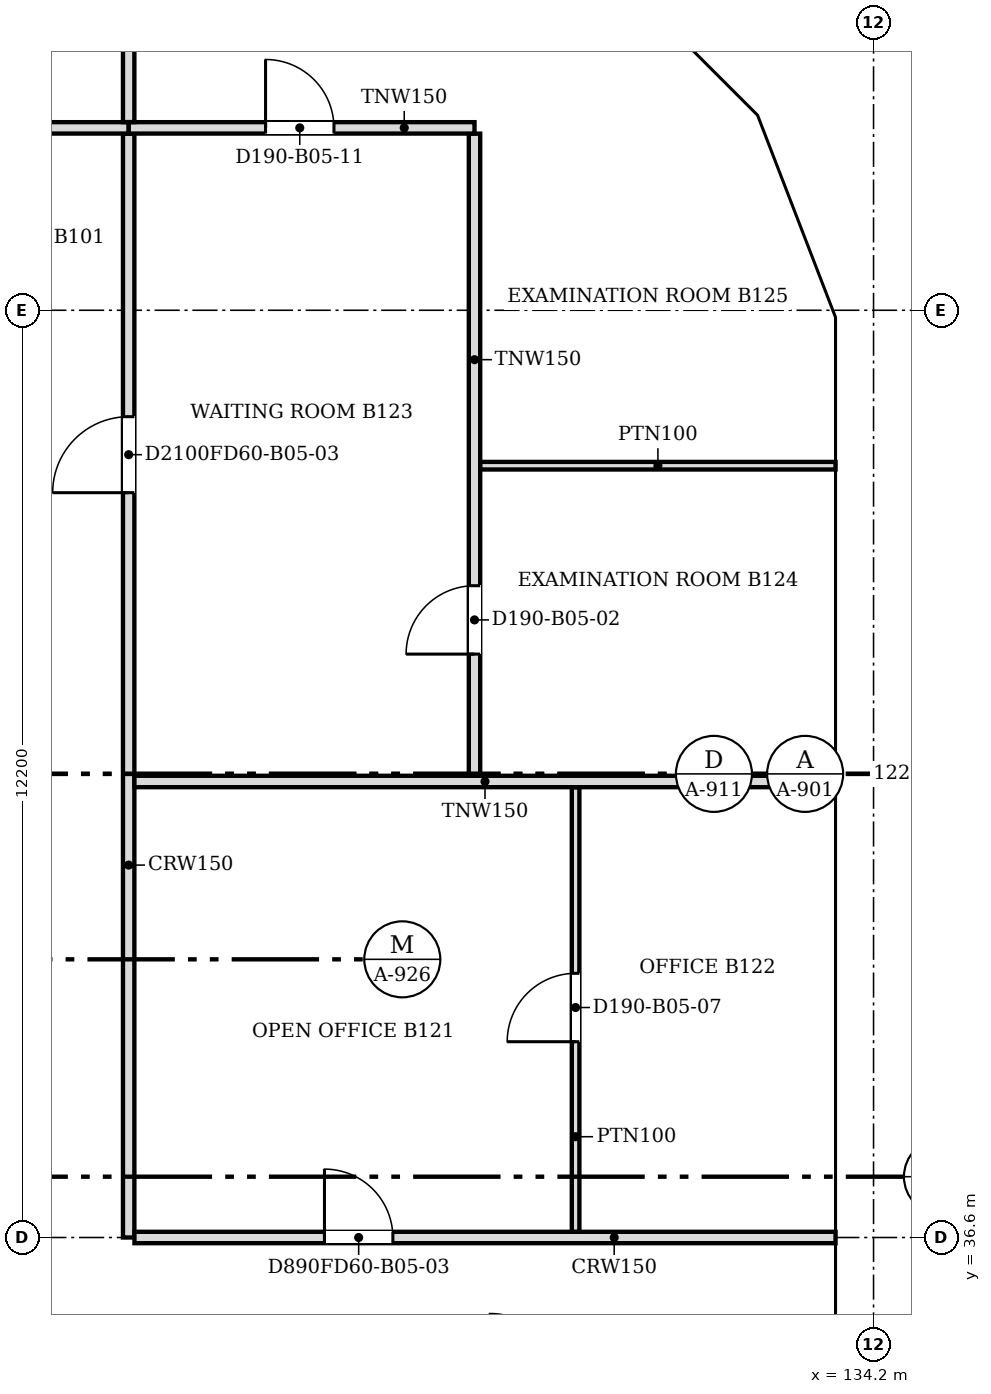
"""IFC4 building model, lengths in metres.
Left out: names, types, materials, properties, quantities, classifications, styles, units other than length and angle.
Written with IfcOpenShell. Run it as: python <this file> out.ifc"""

import sys

from ifc_helpers import new_model, si_unit, direction, frame, frame_2d, origin, place, context, subcontext, project, spatial, polyline, rectangle, outline, extrude, faceted_brep, source, transform, mapped, element, fill, save


model = new_model("IFC4")
c1 = context("Model", 3, precision=1e-05, world=origin(), true_north=direction((0.0, 1.0)))
c2 = subcontext(c1, "Body", "Model", "MODEL_VIEW")
j1 = project(units=[si_unit("LENGTHUNIT", "METRE"), si_unit("PLANEANGLEUNIT", "RADIAN")], contexts=[c1])
p1 = place(None, origin())
s1 = spatial("IfcSite", under=j1, at=p1, CompositionType="ELEMENT")
p2 = place(p1, origin())
s2 = spatial("IfcBuilding", under=s1, at=p2, CompositionType="ELEMENT")
p3 = place(p2, frame((0.0, 0.0, 48.6)))
s3 = spatial("IfcBuildingStorey", under=s2, at=p3, CompositionType="ELEMENT", Elevation=48.6)
m1 = source(origin(), c2, "Body", "SweptSolid", [
    extrude(outline(polyline([(3.05, 0.0), (6.1, 3.8), (3.05, 7.6), (0.0, 3.8), (3.05, 0.0)])), frame((0.0, 0.25, 0.0), z_axis=(0.0, -1.0, 0.0), x_axis=(1.0, 0.0, 0.0)), (0.0, 0.0, 1.0), 0.5),
])
p4 = place(p3, frame((133.95, 30.5, -3.8), z_axis=(0.0, 0.0, 1.0), x_axis=(0.0, 1.0, 0.0)))
e1 = element("IfcWall", 1, at=p4, inside=s3, PredefinedType="SOLIDWALL", context=c2, shape_type="MappedRepresentation", body=[
    mapped(m1, transform((0.0, 0.0, 0.0), scale=1.0)),
])
m2 = source(origin(), c2, "Body", "SweptSolid", [
    extrude(outline(polyline([(3.05, 0.399), (5.78, 3.8), (3.05, 7.2), (0.321, 3.8), (3.05, 0.399)])), frame((0.0, 0.26, 0.0), z_axis=(0.0, -1.0, 0.0), x_axis=(1.0, 0.0, 0.0)), (0.0, 0.0, 1.0), 0.52),
])
p5 = place(p4, origin())
e2 = element("IfcOpeningElement", 2, at=p5, cuts=e1, PredefinedType="OPENING", context=c2, shape_type="MappedRepresentation", body=[
    mapped(m2, transform((0.0, 0.0, 0.0), scale=1.0)),
])
m3 = source(origin(), c2, "Body", "Brep", [
    faceted_brep([(3.05, -0.25, 0.0), (6.1, -0.25, 3.8), (6.1, -0.25, 3.8), (3.05, -0.25, 7.6), (0.0, -0.25, 3.8), (0.0, 0.25, 3.8), (3.05, 0.25, 7.6), (6.1, 0.25, 3.8), (6.1, 0.25, 3.8), (3.05, 0.25, 0.0)], [[[0, 1, 2, 3, 4]], [[5, 6, 7, 8, 9]], [[9, 8, 1, 0]], [[7, 6, 3, 2]], [[6, 5, 4, 3]], [[5, 9, 0, 4]], [[1, 8, 7, 2]]]),
])
p6 = place(p3, frame((133.95, 36.6, -3.8), z_axis=(0.0, 0.0, 1.0), x_axis=(0.0, 1.0, 0.0)))
e3 = element("IfcWall", 3, at=p6, inside=s3, PredefinedType="SOLIDWALL", context=c2, shape_type="MappedRepresentation", body=[
    mapped(m3, transform((0.0, 0.0, 0.0), scale=1.0)),
])
p7 = place(p6, origin())
e4 = element("IfcOpeningElement", 4, at=p7, cuts=e3, PredefinedType="OPENING", context=c2, shape_type="MappedRepresentation", body=[
    mapped(m2, transform((0.0, 0.0, 0.0), scale=1.0)),
])
m4 = source(origin(), c2, "Body", "Brep", [
    faceted_brep([(3.05, -0.25, 0.0), (6.053, -0.25, 3.8), (3.05, -0.25, 7.6), (0.0, -0.25, 3.8), (0.0, 0.25, 3.8), (3.05, 0.25, 7.6), (6.007, 0.25, 3.859), (6.007, 0.25, 3.741), (3.05, 0.25, 0.0), (6.053, 0.0, 3.8)], [[[0, 1, 2, 3]], [[4, 5, 6, 7, 8]], [[8, 7, 9, 1, 0]], [[6, 5, 2, 1, 9]], [[5, 4, 3, 2]], [[4, 8, 0, 3]], [[7, 6, 9]]]),
])
p8 = place(p3, frame((133.95, 42.7, -3.8), z_axis=(0.0, 0.0, 1.0), x_axis=(0.0, 1.0, 0.0)))
e5 = element("IfcWall", 5, at=p8, inside=s3, PredefinedType="SOLIDWALL", context=c2, shape_type="MappedRepresentation", body=[
    mapped(m4, transform((0.0, 0.0, 0.0), scale=1.0)),
])
m5 = source(origin(), c2, "Body", "SweptSolid", [
    extrude(outline(polyline([(3.049, 0.401), (5.735, 3.8), (3.049, 7.199), (0.321, 3.8), (3.049, 0.401)])), frame((0.0, 0.26, 0.0), z_axis=(0.0, -1.0, 0.0), x_axis=(1.0, 0.0, 0.0)), (0.0, 0.0, 1.0), 0.52),
])
p9 = place(p8, origin())
e6 = element("IfcOpeningElement", 6, at=p9, cuts=e5, PredefinedType="OPENING", context=c2, shape_type="MappedRepresentation", body=[
    mapped(m5, transform((0.0, 0.0, 0.0), scale=1.0)),
])
m6 = source(origin(), c2, "Body", "Brep", [
    faceted_brep([(2.95, -0.25, 0.0), (3.003, -0.25, 0.068), (3.003, -0.25, 7.531), (2.95, -0.25, 7.6), (0.0, -0.25, 3.8), (0.047, 0.25, 3.86), (2.898, 0.25, 7.532), (2.898, 0.25, 0.068), (0.047, 0.25, 3.74), (2.95, 0.0, 0.0), (2.95, 0.0, 7.6), (0.0, 0.0, 3.8)], [[[0, 1, 2, 3, 4]], [[5, 6, 7, 8]], [[1, 0, 9]], [[10, 3, 2]], [[6, 5, 11, 4, 3, 10]], [[8, 7, 9, 0, 4, 11]], [[8, 11, 5]], [[1, 9, 7, 6, 10, 2]]]),
])
p10 = place(p3, frame((133.95, 48.753, -3.8), z_axis=(0.0, 0.0, 1.0), x_axis=(-0.359855894603, 0.933007896601, 0.0)))
e7 = element("IfcWall", 7, at=p10, inside=s3, PredefinedType="SOLIDWALL", context=c2, shape_type="MappedRepresentation", body=[
    mapped(m6, transform((0.0, 0.0, 0.0), scale=1.0)),
])
m7 = source(origin(), c2, "Body", "SweptSolid", [
    extrude(outline(polyline([(2.75, 6.935), (0.316, 3.8), (2.75, 0.665), (2.75, 6.935)])), frame((0.0, 0.26, 0.0), z_axis=(0.0, -1.0, 0.0), x_axis=(1.0, 0.0, 0.0)), (0.0, 0.0, 1.0), 0.52),
])
p11 = place(p10, origin())
e8 = element("IfcOpeningElement", 8, at=p11, cuts=e7, PredefinedType="OPENING", context=c2, shape_type="MappedRepresentation", body=[
    mapped(m7, transform((0.0, 0.0, 0.0), scale=1.0)),
])
m8 = source(origin(), c2, "Body", "Brep", [
    faceted_brep([(0.053, -0.25, 0.0), (2.997, -0.25, 3.8), (0.053, -0.25, 7.6), (0.0, -0.25, 7.532), (0.0, -0.25, 0.068), (0.106, 0.25, 7.531), (2.944, 0.25, 3.868), (2.944, 0.25, 3.732), (0.106, 0.25, 0.068), (2.997, 0.0, 3.8), (0.053, 0.0, 0.0), (0.053, 0.0, 7.6)], [[[0, 1, 2, 3, 4]], [[5, 6, 7, 8]], [[8, 7, 9, 1, 0, 10]], [[6, 5, 11, 2, 1, 9]], [[3, 2, 11]], [[10, 0, 4]], [[8, 10, 4, 3, 11, 5]], [[7, 6, 9]]]),
])
p12 = place(p3, frame((132.926, 51.469, -3.8), z_axis=(0.0, 0.0, 1.0), x_axis=(-0.707066050402, 0.707147509625, 0.0)))
e9 = element("IfcWall", 9, at=p12, inside=s3, PredefinedType="SOLIDWALL", context=c2, shape_type="MappedRepresentation", body=[
    mapped(m8, transform((0.0, 0.0, 0.0), scale=1.0)),
])
m9 = source(origin(), c2, "Body", "SweptSolid", [
    extrude(outline(polyline([(0.253, 0.666), (2.681, 3.8), (0.253, 6.934), (0.253, 0.666)])), frame((0.0, 0.26, 0.0), z_axis=(0.0, -1.0, 0.0), x_axis=(1.0, 0.0, 0.0)), (0.0, 0.0, 1.0), 0.52),
])
p13 = place(p12, origin())
e10 = element("IfcOpeningElement", 10, at=p13, cuts=e9, PredefinedType="OPENING", context=c2, shape_type="MappedRepresentation", body=[
    mapped(m9, transform((0.0, 0.0, 0.0), scale=1.0)),
])
p14 = place(p2, frame((0.0, 0.0, 52.4)))
s4 = spatial("IfcBuildingStorey", under=s2, at=p14, CompositionType="ELEMENT", Elevation=52.4)
m10 = source(origin(), c2, "Body", "Brep", [
    faceted_brep([(3.05, -0.25, 0.0), (6.1, -0.25, 3.8), (6.1, -0.25, 3.8), (3.05, -0.25, 7.6), (0.0, -0.25, 3.8), (0.0, 0.25, 3.8), (3.05, 0.25, 7.6), (6.1, 0.25, 3.8), (6.1, 0.25, 3.8), (3.05, 0.25, 0.0)], [[[0, 1, 2, 3, 4]], [[5, 6, 7, 8, 9]], [[9, 8, 1, 0]], [[7, 6, 3, 2]], [[6, 5, 4, 3]], [[5, 9, 0, 4]], [[1, 8, 7, 2]]]),
])
p15 = place(p14, frame((133.95, 33.55, -3.8), z_axis=(0.0, 0.0, 1.0), x_axis=(0.0, 1.0, 0.0)))
e11 = element("IfcWall", 11, at=p15, inside=s4, PredefinedType="SOLIDWALL", context=c2, shape_type="MappedRepresentation", body=[
    mapped(m10, transform((0.0, 0.0, 0.0), scale=1.0)),
])
m11 = source(origin(), c2, "Body", "SweptSolid", [
    extrude(outline(polyline([(3.05, 0.399), (5.78, 3.8), (3.05, 7.2), (0.321, 3.8), (3.05, 0.399)])), frame((0.0, 0.26, 0.0), z_axis=(0.0, -1.0, 0.0), x_axis=(1.0, 0.0, 0.0)), (0.0, 0.0, 1.0), 0.52),
])
p16 = place(p15, origin())
e12 = element("IfcOpeningElement", 12, at=p16, cuts=e11, PredefinedType="OPENING", context=c2, shape_type="MappedRepresentation", body=[
    mapped(m11, transform((0.0, 0.0, 0.0), scale=1.0)),
])
m12 = source(origin(), c2, "Body", "SweptSolid", [
    extrude(outline(polyline([(3.05, 0.0), (6.1, 3.8), (3.05, 7.6), (0.0, 3.8), (3.05, 0.0)])), frame((0.0, 0.25, 0.0), z_axis=(0.0, -1.0, 0.0), x_axis=(1.0, 0.0, 0.0)), (0.0, 0.0, 1.0), 0.5),
])
p17 = place(p14, frame((133.95, 39.65, -3.8), z_axis=(0.0, 0.0, 1.0), x_axis=(0.0, 1.0, 0.0)))
e13 = element("IfcWall", 13, at=p17, inside=s4, PredefinedType="SOLIDWALL", context=c2, shape_type="MappedRepresentation", body=[
    mapped(m12, transform((0.0, 0.0, 0.0), scale=1.0)),
])
p18 = place(p17, origin())
e14 = element("IfcOpeningElement", 14, at=p18, cuts=e13, PredefinedType="OPENING", context=c2, shape_type="MappedRepresentation", body=[
    mapped(m11, transform((0.0, 0.0, 0.0), scale=1.0)),
])
m13 = source(origin(), c2, "Body", "Brep", [
    faceted_brep([(3.003, -0.25, 0.0), (3.05, -0.25, 0.06), (3.05, -0.25, 7.54), (3.003, -0.25, 7.6), (0.0, -0.25, 3.8), (0.0, 0.25, 3.8), (2.957, 0.25, 7.541), (2.957, 0.25, 0.059), (3.003, 0.0, 0.0), (3.003, 0.0, 7.6)], [[[0, 1, 2, 3, 4]], [[5, 6, 7]], [[1, 0, 8]], [[9, 3, 2]], [[6, 5, 4, 3, 9]], [[5, 7, 8, 0, 4]], [[1, 8, 7, 6, 9, 2]]]),
])
p19 = place(p14, frame((133.95, 45.75, -3.8), z_axis=(0.0, 0.0, 1.0), x_axis=(0.0, 1.0, 0.0)))
e15 = element("IfcWall", 15, at=p19, inside=s4, PredefinedType="SOLIDWALL", context=c2, shape_type="MappedRepresentation", body=[
    mapped(m13, transform((0.0, 0.0, 0.0), scale=1.0)),
])
m14 = source(origin(), c2, "Body", "SweptSolid", [
    extrude(outline(polyline([(2.803, 6.944), (0.319, 3.8), (2.803, 0.656), (2.803, 6.944)])), frame((0.0, 0.26, 0.0), z_axis=(0.0, -1.0, 0.0), x_axis=(1.0, 0.0, 0.0)), (0.0, 0.0, 1.0), 0.52),
])
p20 = place(p19, origin())
e16 = element("IfcOpeningElement", 16, at=p20, cuts=e15, PredefinedType="OPENING", context=c2, shape_type="MappedRepresentation", body=[
    mapped(m14, transform((0.0, 0.0, 0.0), scale=1.0)),
])
m15 = source(origin(), c2, "Body", "Brep", [
    faceted_brep([(0.047, -0.25, 0.0), (2.997, -0.25, 3.8), (0.047, -0.25, 7.6), (0.0, -0.25, 7.541), (0.0, -0.25, 0.059), (0.093, 0.25, 7.54), (2.944, 0.25, 3.868), (2.944, 0.25, 3.732), (0.093, 0.25, 0.06), (2.997, 0.0, 3.8), (0.047, 0.0, 0.0), (0.047, 0.0, 7.6)], [[[0, 1, 2, 3, 4]], [[5, 6, 7, 8]], [[8, 7, 9, 1, 0, 10]], [[6, 5, 11, 2, 1, 9]], [[3, 2, 11]], [[10, 0, 4]], [[8, 10, 4, 3, 11, 5]], [[9, 7, 6]]]),
])
p21 = place(p14, frame((133.967, 48.71, -3.8), z_axis=(0.0, 0.0, 1.0), x_axis=(-0.359901446078, 0.932990326376, 0.0)))
e17 = element("IfcWall", 17, at=p21, inside=s4, PredefinedType="SOLIDWALL", context=c2, shape_type="MappedRepresentation", body=[
    mapped(m15, transform((0.0, 0.0, 0.0), scale=1.0)),
])
m16 = source(origin(), c2, "Body", "SweptSolid", [
    extrude(outline(polyline([(0.247, 0.665), (2.681, 3.8), (0.247, 6.935), (0.247, 0.665)])), frame((0.0, 0.26, 0.0), z_axis=(0.0, -1.0, 0.0), x_axis=(1.0, 0.0, 0.0)), (0.0, 0.0, 1.0), 0.52),
])
p22 = place(p21, origin())
e18 = element("IfcOpeningElement", 18, at=p22, cuts=e17, PredefinedType="OPENING", context=c2, shape_type="MappedRepresentation", body=[
    mapped(m16, transform((0.0, 0.0, 0.0), scale=1.0)),
])
m17 = source(origin(), c2, "Body", "Brep", [
    faceted_brep([(2.944, -0.25, 0.0), (2.997, -0.25, 0.068), (2.997, -0.25, 7.532), (2.944, -0.25, 7.6), (0.0, -0.25, 3.8), (0.053, 0.25, 3.868), (2.891, 0.25, 7.532), (2.891, 0.25, 0.068), (0.053, 0.25, 3.731), (2.944, 0.0, 0.0), (2.944, 0.0, 7.6), (0.0, 0.0, 3.8)], [[[0, 1, 2, 3, 4]], [[5, 6, 7, 8]], [[1, 0, 9]], [[10, 3, 2]], [[6, 5, 11, 4, 3, 10]], [[8, 7, 9, 0, 4, 11]], [[8, 11, 5]], [[1, 9, 7, 6, 10, 2]]]),
])
p23 = place(p14, frame((132.888, 51.506, -3.8), z_axis=(0.0, 0.0, 1.0), x_axis=(-0.707147509625, 0.707066050402, 0.0)))
e19 = element("IfcWall", 19, at=p23, inside=s4, PredefinedType="SOLIDWALL", context=c2, shape_type="MappedRepresentation", body=[
    mapped(m17, transform((0.0, 0.0, 0.0), scale=1.0)),
])
m18 = source(origin(), c2, "Body", "SweptSolid", [
    extrude(outline(polyline([(2.744, 6.934), (0.316, 3.8), (2.744, 0.666), (2.744, 6.934)])), frame((0.0, 0.26, 0.0), z_axis=(0.0, -1.0, 0.0), x_axis=(1.0, 0.0, 0.0)), (0.0, 0.0, 1.0), 0.52),
])
p24 = place(p23, origin())
e20 = element("IfcOpeningElement", 20, at=p24, cuts=e19, PredefinedType="OPENING", context=c2, shape_type="MappedRepresentation", body=[
    mapped(m18, transform((0.0, 0.0, 0.0), scale=1.0)),
])
p25 = place(p3, frame((124.4, 51.124, 0.0), z_axis=(0.0, 0.0, 1.0), x_axis=(0.0, -1.0, 0.0)))
e21 = element("IfcWall", 21, at=p25, inside=s3, PredefinedType="PARTITIONING", context=c2, shape_type="SweptSolid", body=[
    extrude(rectangle(XDim=14.524, YDim=0.15, at=frame_2d((7.262, 0.0))), origin(), (0.0, 0.0, 1.0), 3.067),
])
m19 = source(origin(), c2, "Body", "SweptSolid", [
    extrude(rectangle(XDim=1.0, YDim=2.1, at=frame_2d((0.5, 1.05))), frame((0.0, 0.085, 0.0), z_axis=(0.0, -1.0, 0.0), x_axis=(1.0, 0.0, 0.0)), (0.0, 0.0, 1.0), 0.17),
])
p26 = place(p25, frame((3.724, 0.0, 0.0)))
e22 = element("IfcOpeningElement", 22, at=p26, cuts=e21, PredefinedType="OPENING", context=c2, shape_type="MappedRepresentation", body=[
    mapped(m19, transform((0.0, 0.0, 0.0), scale=1.0)),
])
p27 = place(p3, frame((124.476, 36.6, 0.0), z_axis=(0.0, 0.0, 1.0), x_axis=(1.0, 0.0, 0.0)))
e23 = element("IfcWall", 23, at=p27, inside=s3, PredefinedType="PARTITIONING", context=c2, shape_type="SweptSolid", body=[
    extrude(rectangle(XDim=9.224, YDim=0.15, at=frame_2d((4.612, 0.0))), origin(), (0.0, 0.0, 1.0), 3.067),
])
m20 = source(origin(), c2, "Body", "SweptSolid", [
    extrude(rectangle(XDim=0.9, YDim=2.1, at=frame_2d((0.45, 1.05))), frame((0.0, 0.085, 0.0), z_axis=(0.0, -1.0, 0.0), x_axis=(1.0, 0.0, 0.0)), (0.0, 0.0, 1.0), 0.17),
])
p28 = place(p27, frame((2.5, 0.0, 0.0)))
e24 = element("IfcOpeningElement", 24, at=p28, cuts=e23, PredefinedType="OPENING", context=c2, shape_type="MappedRepresentation", body=[
    mapped(m20, transform((0.0, 0.0, 0.0), scale=1.0)),
])
p29 = place(p3, frame((130.28, 42.524, 0.0), z_axis=(0.0, 0.0, 1.0), x_axis=(0.0, -1.0, 0.0)))
e25 = element("IfcWall", 25, at=p29, inside=s3, PredefinedType="PARTITIONING", context=c2, shape_type="SweptSolid", body=[
    extrude(rectangle(XDim=5.848, YDim=0.1, at=frame_2d((2.924, 0.0))), origin(), (0.0, 0.0, 1.0), 3.067),
])
m21 = source(origin(), c2, "Body", "SweptSolid", [
    extrude(rectangle(XDim=0.9, YDim=2.1, at=frame_2d((0.45, 1.05))), frame((0.0, 0.06, 0.0), z_axis=(0.0, -1.0, 0.0), x_axis=(1.0, 0.0, 0.0)), (0.0, 0.0, 1.0), 0.12),
])
p30 = place(p29, frame((2.448, 0.0, 0.0)))
e26 = element("IfcOpeningElement", 26, at=p30, cuts=e25, PredefinedType="OPENING", context=c2, shape_type="MappedRepresentation", body=[
    mapped(m21, transform((0.0, 0.0, 0.0), scale=1.0)),
])
p31 = place(p3, frame((124.476, 42.6, 0.0), z_axis=(0.0, 0.0, 1.0), x_axis=(1.0, 0.0, 0.0)))
e27 = element("IfcWall", 27, at=p31, inside=s3, PredefinedType="PARTITIONING", context=c2, shape_type="SweptSolid", body=[
    extrude(rectangle(XDim=9.224, YDim=0.15, at=frame_2d((4.612, 0.0))), origin(), (0.0, 0.0, 1.0), 3.067),
])
p32 = place(p3, frame((128.95, 51.124, 0.0), z_axis=(0.0, 0.0, 1.0), x_axis=(0.0, -1.0, 0.0)))
e28 = element("IfcWall", 28, at=p32, inside=s3, PredefinedType="PARTITIONING", context=c2, shape_type="SweptSolid", body=[
    extrude(rectangle(XDim=8.448, YDim=0.15, at=frame_2d((4.224, 0.0))), origin(), (0.0, 0.0, 1.0), 3.067),
])
p33 = place(p32, frame((5.948, 0.0, 0.0)))
e29 = element("IfcOpeningElement", 29, at=p33, cuts=e28, PredefinedType="OPENING", context=c2, shape_type="MappedRepresentation", body=[
    mapped(m20, transform((0.0, 0.0, 0.0), scale=1.0)),
])
p34 = place(p3, frame((129.026, 46.755, 0.0), z_axis=(0.0, 0.0, 1.0), x_axis=(1.0, 0.0, 0.0)))
e30 = element("IfcWall", 30, at=p34, inside=s3, PredefinedType="PARTITIONING", context=c2, shape_type="SweptSolid", body=[
    extrude(rectangle(XDim=4.674, YDim=0.1, at=frame_2d((2.337, 0.0))), origin(), (0.0, 0.0, 1.0), 3.067),
])
p35 = place(p3, frame((108.5, 51.2, 0.0), z_axis=(0.0, 0.0, 1.0), x_axis=(1.0, 0.0, 0.0)))
e31 = element("IfcWall", 31, at=p35, inside=s3, PredefinedType="PARTITIONING", context=c2, shape_type="SweptSolid", body=[
    extrude(rectangle(XDim=15.9, YDim=0.15, at=frame_2d((7.95, 0.0))), origin(), (0.0, 0.0, 1.0), 3.067),
])
p36 = place(p35, frame((7.4, 0.0, 0.0)))
e32 = element("IfcOpeningElement", 32, at=p36, cuts=e31, PredefinedType="OPENING", context=c2, shape_type="MappedRepresentation", body=[
    mapped(m19, transform((0.0, 0.0, 0.0), scale=1.0)),
])
p37 = place(p3, frame((124.401, 51.2, 0.0), z_axis=(0.0, 0.0, 1.0), x_axis=(1.0, 0.0, 0.0)))
e33 = element("IfcWall", 33, at=p37, inside=s3, PredefinedType="PARTITIONING", context=c2, shape_type="SweptSolid", body=[
    extrude(rectangle(XDim=4.549, YDim=0.15, at=frame_2d((2.274, 0.0))), origin(), (0.0, 0.0, 1.0), 3.067),
])
p38 = place(p37, frame((1.8, 0.0, 0.0)))
e34 = element("IfcOpeningElement", 34, at=p38, cuts=e33, PredefinedType="OPENING", context=c2, shape_type="MappedRepresentation", body=[
    mapped(m20, transform((0.0, 0.0, 0.0), scale=1.0)),
])
p39 = place(p3, frame((124.4, 51.276, 0.0), z_axis=(0.0, 0.0, 1.0), x_axis=(0.0, 1.0, 0.0)))
e35 = element("IfcWall", 35, at=p39, inside=s3, PredefinedType="PARTITIONING", context=c2, shape_type="SweptSolid", body=[
    extrude(rectangle(XDim=3.124, YDim=0.15, at=frame_2d((1.562, 0.0))), origin(), (0.0, 0.0, 1.0), 3.067),
])
m22 = source(origin(), c2, "Body", "SweptSolid", [
    extrude(rectangle(XDim=0.9, YDim=2.1, at=frame_2d((0.45, 1.05))), frame((0.0, 0.025, 0.0), z_axis=(0.0, -1.0, 0.0), x_axis=(1.0, 0.0, 0.0)), (0.0, 0.0, 1.0), 0.05),
])
p40 = place(p33, origin())
e36 = element("IfcDoor", 36, at=p40, inside=s3, OperationType="SINGLE_SWING_RIGHT", PredefinedType="DOOR", context=c2, shape_type="MappedRepresentation", body=[
    mapped(m22, transform((0.0, 0.0, 0.0), scale=1.0)),
])
fill(e29, e36)
p41 = place(p30, origin())
e37 = element("IfcDoor", 37, at=p41, inside=s3, OperationType="SINGLE_SWING_RIGHT", PredefinedType="DOOR", context=c2, shape_type="MappedRepresentation", body=[
    mapped(m22, transform((0.0, 0.0, 0.0), scale=1.0)),
])
fill(e26, e37)
m23 = source(origin(), c2, "Body", "SweptSolid", [
    extrude(rectangle(XDim=1.0, YDim=2.1, at=frame_2d((0.5, 1.05))), frame((0.0, 0.025, 0.0), z_axis=(0.0, -1.0, 0.0), x_axis=(1.0, 0.0, 0.0)), (0.0, 0.0, 1.0), 0.05),
])
p42 = place(p26, origin())
e38 = element("IfcDoor", 38, at=p42, inside=s3, OperationType="SINGLE_SWING_RIGHT", PredefinedType="DOOR", context=c2, shape_type="MappedRepresentation", body=[
    mapped(m23, transform((0.0, 0.0, 0.0), scale=1.0)),
])
fill(e22, e38)
p43 = place(p38, origin())
e39 = element("IfcDoor", 39, at=p43, inside=s3, OperationType="SINGLE_SWING_LEFT", PredefinedType="DOOR", context=c2, shape_type="MappedRepresentation", body=[
    mapped(m22, transform((0.0, 0.0, 0.0), scale=1.0)),
])
fill(e34, e39)
p44 = place(p28, origin())
e40 = element("IfcDoor", 40, at=p44, inside=s3, OperationType="SINGLE_SWING_LEFT", PredefinedType="DOOR", context=c2, shape_type="MappedRepresentation", body=[
    mapped(m22, transform((0.0, 0.0, 0.0), scale=1.0)),
])
fill(e24, e40)
save(model, sys.argv[1])
